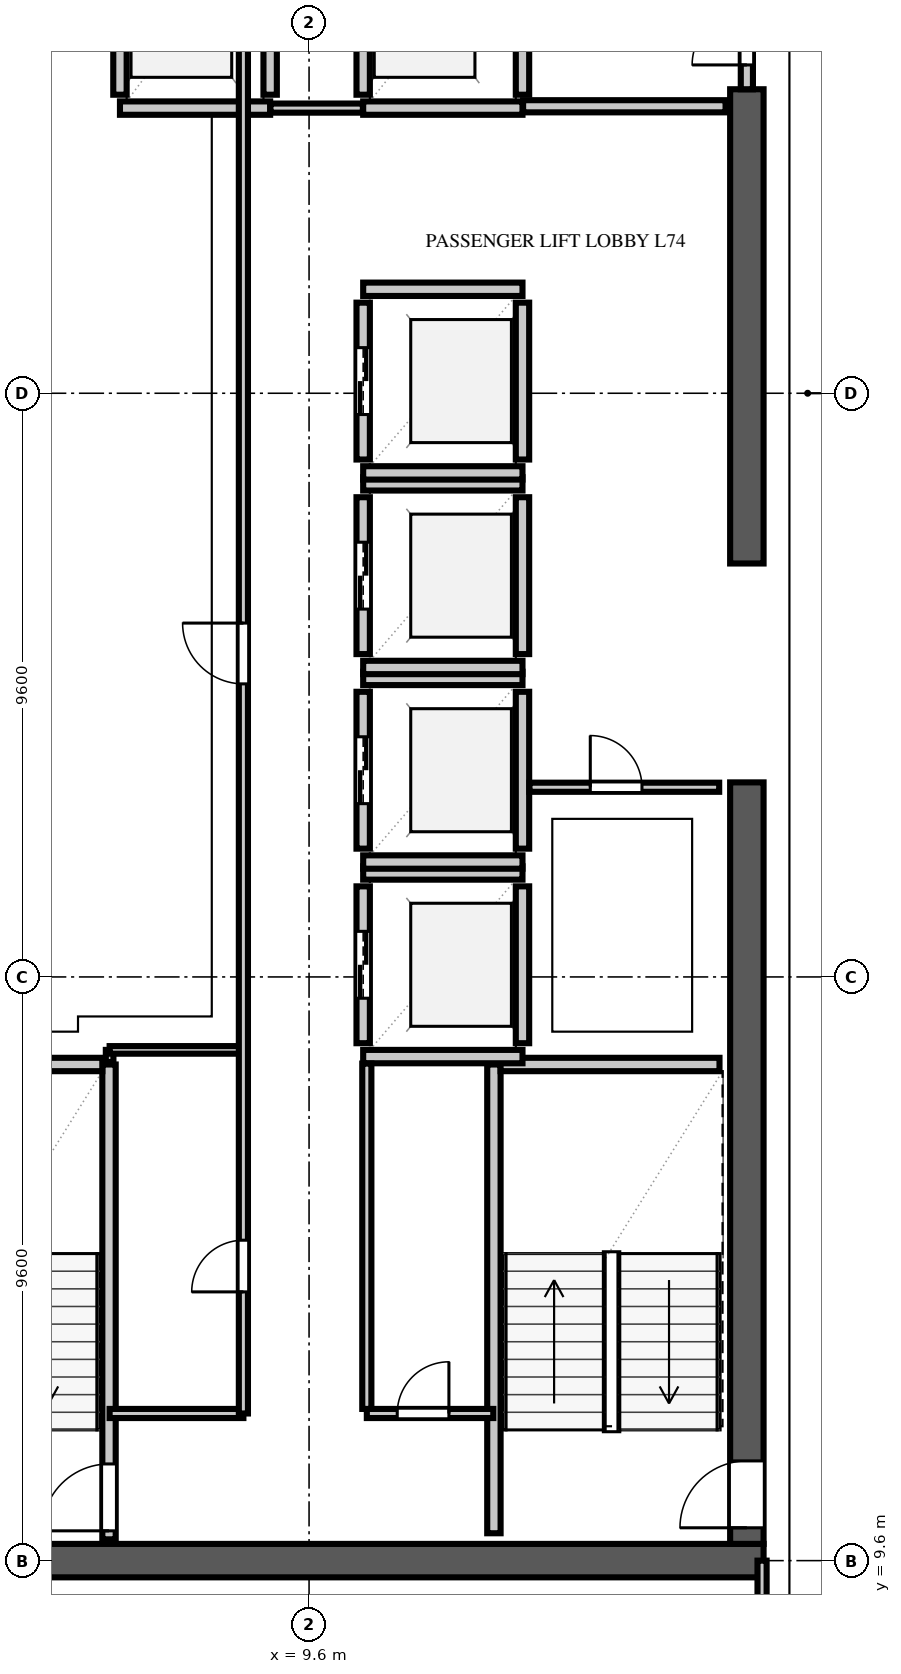
"""IFC4 building model, lengths in metres.
Left out: names, types, materials, properties, quantities, classifications, styles, units other than length and angle.
Written with IfcOpenShell. Run it as: python <this file> out.ifc"""

import sys

from ifc_helpers import new_model, si_unit, direction, frame, frame_2d, origin, place, context, subcontext, project, spatial, rectangle, extrude, element, fill, save


model = new_model("IFC4")
c1 = context("Model", 3, precision=1e-05, world=origin(), true_north=direction((0.0, 1.0)))
c2 = subcontext(c1, "Body", "Model", "MODEL_VIEW")
j1 = project(units=[si_unit("LENGTHUNIT", "METRE"), si_unit("PLANEANGLEUNIT", "RADIAN")], contexts=[c1])
p1 = place(None, origin())
s1 = spatial("IfcSite", under=j1, at=p1, CompositionType="ELEMENT")
p2 = place(p1, origin())
s2 = spatial("IfcBuilding", under=s1, at=p2, CompositionType="ELEMENT")
p3 = place(p2, frame((0.0, 0.0, 292.4)))
s3 = spatial("IfcBuildingStorey", under=s2, at=p3, CompositionType="ELEMENT", Elevation=292.4)
p4 = place(p3, frame((2.475, 9.6, 0.0), z_axis=(0.0, 0.0, 1.0), x_axis=(1.0, 0.0, 0.0)))
e1 = element("IfcWall", 1, at=p4, inside=s3, PredefinedType="SHEAR", context=c2, shape_type="SweptSolid", body=[
    extrude(rectangle(XDim=14.6, YDim=0.55, at=frame_2d((7.3, 0.0))), origin(), (0.0, 0.0, 1.0), 3.54),
])
p5 = place(p3, frame((16.8, 9.875, 0.0), z_axis=(0.0, 0.0, 1.0), x_axis=(0.0, 1.0, 0.0)))
e2 = element("IfcWall", 2, at=p5, inside=s3, PredefinedType="SHEAR", context=c2, shape_type="SweptSolid", body=[
    extrude(rectangle(XDim=12.525, YDim=0.55, at=frame_2d((6.262, 0.0))), origin(), (0.0, 0.0, 1.0), 3.54),
])
p6 = place(p5, frame((0.265, 0.0, 0.0)))
e3 = element("IfcOpeningElement", 3, at=p6, cuts=e2, PredefinedType="OPENING", context=c2, shape_type="SweptSolid", body=[
    extrude(rectangle(XDim=1.1, YDim=2.2, at=frame_2d((0.55, 1.1))), frame((0.0, 0.287, 0.0), z_axis=(0.0, -1.0, 0.0), x_axis=(1.0, 0.0, 0.0)), (0.0, 0.0, 1.0), 0.574),
])
p7 = place(p3, frame((16.8, 26.0, 0.0), z_axis=(0.0, 0.0, 1.0), x_axis=(0.0, 1.0, 0.0)))
e4 = element("IfcWall", 4, at=p7, inside=s3, PredefinedType="SHEAR", context=c2, shape_type="SweptSolid", body=[
    extrude(rectangle(XDim=7.8, YDim=0.55, at=frame_2d((3.9, 0.0))), origin(), (0.0, 0.0, 1.0), 3.54),
])
p8 = place(p3, frame((6.31, 9.95, 0.0), z_axis=(0.0, 0.0, 1.0), x_axis=(0.0, 1.0, 0.0)))
e5 = element("IfcWall", 5, at=p8, inside=s3, PredefinedType="SOLIDWALL", context=c2, shape_type="SweptSolid", body=[
    extrude(rectangle(XDim=7.81, YDim=0.22, at=frame_2d((3.905, 0.0))), origin(), (0.0, 0.0, 1.0), 3.54),
])
p9 = place(p8, frame((0.14, 0.0, 0.0)))
e6 = element("IfcOpeningElement", 6, at=p9, cuts=e5, PredefinedType="OPENING", context=c2, shape_type="SweptSolid", body=[
    extrude(rectangle(XDim=1.1, YDim=2.2, at=frame_2d((0.55, 1.1))), frame((0.0, 0.122, 0.0), z_axis=(0.0, -1.0, 0.0), x_axis=(1.0, 0.0, 0.0)), (0.0, 0.0, 1.0), 0.244),
])
p10 = place(p3, frame((2.65, 17.76, 0.0), z_axis=(0.0, 0.0, 1.0), x_axis=(1.0, 0.0, 0.0)))
e7 = element("IfcWall", 7, at=p10, inside=s3, PredefinedType="SOLIDWALL", context=c2, shape_type="SweptSolid", body=[
    extrude(rectangle(XDim=3.55, YDim=0.22, at=frame_2d((1.775, 0.0))), origin(), (0.0, 0.0, 1.0), 3.54),
])
p11 = place(p3, frame((12.64, 10.05, 0.0), z_axis=(0.0, 0.0, 1.0), x_axis=(0.0, 1.0, 0.0)))
e8 = element("IfcWall", 8, at=p11, inside=s3, PredefinedType="SOLIDWALL", context=c2, shape_type="SweptSolid", body=[
    extrude(rectangle(XDim=7.71, YDim=0.22, at=frame_2d((3.855, 0.0))), origin(), (0.0, 0.0, 1.0), 3.54),
])
p12 = place(p3, frame((12.75, 17.76, 0.0), z_axis=(0.0, 0.0, 1.0), x_axis=(1.0, 0.0, 0.0)))
e9 = element("IfcWall", 9, at=p12, inside=s3, PredefinedType="SOLIDWALL", context=c2, shape_type="SweptSolid", body=[
    extrude(rectangle(XDim=3.6, YDim=0.22, at=frame_2d((1.8, 0.0))), origin(), (0.0, 0.0, 1.0), 3.54),
])
p13 = place(p3, frame((10.49, 18.11, 0.0), z_axis=(0.0, 0.0, 1.0), x_axis=(0.0, 1.0, 0.0)))
e10 = element("IfcWall", 10, at=p13, inside=s3, PredefinedType="SOLIDWALL", context=c2, shape_type="SweptSolid", body=[
    extrude(rectangle(XDim=2.58, YDim=0.22, at=frame_2d((1.29, 0.0))), origin(), (0.0, 0.0, 1.0), 3.54),
])
p14 = place(p13, frame((0.74, 0.0, 0.0)))
e11 = element("IfcOpeningElement", 11, at=p14, cuts=e10, PredefinedType="OPENING", context=c2, shape_type="SweptSolid", body=[
    extrude(rectangle(XDim=1.1, YDim=2.2, at=frame_2d((0.55, 1.1))), frame((0.0, 0.122, 0.0), z_axis=(0.0, -1.0, 0.0), x_axis=(1.0, 0.0, 0.0)), (0.0, 0.0, 1.0), 0.244),
])
p15 = place(p3, frame((13.11, 18.11, 0.0), z_axis=(0.0, 0.0, 1.0), x_axis=(0.0, 1.0, 0.0)))
e12 = element("IfcWall", 12, at=p15, inside=s3, PredefinedType="SOLIDWALL", context=c2, shape_type="SweptSolid", body=[
    extrude(rectangle(XDim=2.58, YDim=0.22, at=frame_2d((1.29, 0.0))), origin(), (0.0, 0.0, 1.0), 3.54),
])
for number, where, z_axis, x_axis in (
    (13, (10.49, 17.89, 0.0), (0.0, 0.0, 1.0), (1.0, 0.0, 0.0)),
    (14, (10.49, 20.91, 0.0), (0.0, 0.0, 1.0), (1.0, 0.0, 0.0)),
):
    element("IfcWall", number, at=place(p3, frame(where, z_axis=z_axis, x_axis=x_axis)), inside=s3, PredefinedType="SOLIDWALL", context=c2, shape_type="SweptSolid", body=[
        extrude(rectangle(XDim=2.62, YDim=0.22, at=frame_2d((1.31, 0.0))), origin(), (0.0, 0.0, 1.0), 3.54),
    ])
p16 = place(p3, frame((10.49, 21.31, 0.0), z_axis=(0.0, 0.0, 1.0), x_axis=(0.0, 1.0, 0.0)))
e15 = element("IfcWall", 15, at=p16, inside=s3, PredefinedType="SOLIDWALL", context=c2, shape_type="SweptSolid", body=[
    extrude(rectangle(XDim=2.58, YDim=0.22, at=frame_2d((1.29, 0.0))), origin(), (0.0, 0.0, 1.0), 3.54),
])
p17 = place(p16, frame((0.74, 0.0, 0.0)))
e16 = element("IfcOpeningElement", 16, at=p17, cuts=e15, PredefinedType="OPENING", context=c2, shape_type="SweptSolid", body=[
    extrude(rectangle(XDim=1.1, YDim=2.2, at=frame_2d((0.55, 1.1))), frame((0.0, 0.122, 0.0), z_axis=(0.0, -1.0, 0.0), x_axis=(1.0, 0.0, 0.0)), (0.0, 0.0, 1.0), 0.244),
])
p18 = place(p3, frame((13.11, 21.31, 0.0), z_axis=(0.0, 0.0, 1.0), x_axis=(0.0, 1.0, 0.0)))
e17 = element("IfcWall", 17, at=p18, inside=s3, PredefinedType="SOLIDWALL", context=c2, shape_type="SweptSolid", body=[
    extrude(rectangle(XDim=2.58, YDim=0.22, at=frame_2d((1.29, 0.0))), origin(), (0.0, 0.0, 1.0), 3.54),
])
for number, where, z_axis, x_axis in (
    (18, (10.49, 21.09, 0.0), (0.0, 0.0, 1.0), (1.0, 0.0, 0.0)),
    (19, (10.49, 24.11, 0.0), (0.0, 0.0, 1.0), (1.0, 0.0, 0.0)),
):
    element("IfcWall", number, at=place(p3, frame(where, z_axis=z_axis, x_axis=x_axis)), inside=s3, PredefinedType="SOLIDWALL", context=c2, shape_type="SweptSolid", body=[
        extrude(rectangle(XDim=2.62, YDim=0.22, at=frame_2d((1.31, 0.0))), origin(), (0.0, 0.0, 1.0), 3.54),
    ])
p19 = place(p3, frame((10.49, 24.51, 0.0), z_axis=(0.0, 0.0, 1.0), x_axis=(0.0, 1.0, 0.0)))
e20 = element("IfcWall", 20, at=p19, inside=s3, PredefinedType="SOLIDWALL", context=c2, shape_type="SweptSolid", body=[
    extrude(rectangle(XDim=2.58, YDim=0.22, at=frame_2d((1.29, 0.0))), origin(), (0.0, 0.0, 1.0), 3.54),
])
p20 = place(p19, frame((0.74, 0.0, 0.0)))
e21 = element("IfcOpeningElement", 21, at=p20, cuts=e20, PredefinedType="OPENING", context=c2, shape_type="SweptSolid", body=[
    extrude(rectangle(XDim=1.1, YDim=2.2, at=frame_2d((0.55, 1.1))), frame((0.0, 0.122, 0.0), z_axis=(0.0, -1.0, 0.0), x_axis=(1.0, 0.0, 0.0)), (0.0, 0.0, 1.0), 0.244),
])
p21 = place(p3, frame((13.11, 24.51, 0.0), z_axis=(0.0, 0.0, 1.0), x_axis=(0.0, 1.0, 0.0)))
e22 = element("IfcWall", 22, at=p21, inside=s3, PredefinedType="SOLIDWALL", context=c2, shape_type="SweptSolid", body=[
    extrude(rectangle(XDim=2.58, YDim=0.22, at=frame_2d((1.29, 0.0))), origin(), (0.0, 0.0, 1.0), 3.54),
])
for number, where, z_axis, x_axis in (
    (23, (10.49, 24.29, 0.0), (0.0, 0.0, 1.0), (1.0, 0.0, 0.0)),
    (24, (10.49, 27.31, 0.0), (0.0, 0.0, 1.0), (1.0, 0.0, 0.0)),
):
    element("IfcWall", number, at=place(p3, frame(where, z_axis=z_axis, x_axis=x_axis)), inside=s3, PredefinedType="SOLIDWALL", context=c2, shape_type="SweptSolid", body=[
        extrude(rectangle(XDim=2.62, YDim=0.22, at=frame_2d((1.31, 0.0))), origin(), (0.0, 0.0, 1.0), 3.54),
    ])
p22 = place(p3, frame((10.49, 27.71, 0.0), z_axis=(0.0, 0.0, 1.0), x_axis=(0.0, 1.0, 0.0)))
e25 = element("IfcWall", 25, at=p22, inside=s3, PredefinedType="SOLIDWALL", context=c2, shape_type="SweptSolid", body=[
    extrude(rectangle(XDim=2.58, YDim=0.22, at=frame_2d((1.29, 0.0))), origin(), (0.0, 0.0, 1.0), 3.54),
])
p23 = place(p22, frame((0.74, 0.0, 0.0)))
e26 = element("IfcOpeningElement", 26, at=p23, cuts=e25, PredefinedType="OPENING", context=c2, shape_type="SweptSolid", body=[
    extrude(rectangle(XDim=1.1, YDim=2.2, at=frame_2d((0.55, 1.1))), frame((0.0, 0.122, 0.0), z_axis=(0.0, -1.0, 0.0), x_axis=(1.0, 0.0, 0.0)), (0.0, 0.0, 1.0), 0.244),
])
p24 = place(p3, frame((13.11, 27.71, 0.0), z_axis=(0.0, 0.0, 1.0), x_axis=(0.0, 1.0, 0.0)))
e27 = element("IfcWall", 27, at=p24, inside=s3, PredefinedType="SOLIDWALL", context=c2, shape_type="SweptSolid", body=[
    extrude(rectangle(XDim=2.58, YDim=0.22, at=frame_2d((1.29, 0.0))), origin(), (0.0, 0.0, 1.0), 3.54),
])
for number, where, z_axis, x_axis in (
    (28, (10.49, 27.49, 0.0), (0.0, 0.0, 1.0), (1.0, 0.0, 0.0)),
    (29, (10.49, 30.51, 0.0), (0.0, 0.0, 1.0), (1.0, 0.0, 0.0)),
):
    element("IfcWall", number, at=place(p3, frame(where, z_axis=z_axis, x_axis=x_axis)), inside=s3, PredefinedType="SOLIDWALL", context=c2, shape_type="SweptSolid", body=[
        extrude(rectangle(XDim=2.62, YDim=0.22, at=frame_2d((1.31, 0.0))), origin(), (0.0, 0.0, 1.0), 3.54),
    ])
for number, where, z_axis, x_axis in (
    (30, (6.49, 33.71, 0.0), (0.0, 0.0, 1.0), (0.0, 1.0, 0.0)),
    (31, (8.96, 33.71, 0.0), (0.0, 0.0, 1.0), (0.0, 1.0, 0.0)),
):
    element("IfcWall", number, at=place(p3, frame(where, z_axis=z_axis, x_axis=x_axis)), inside=s3, PredefinedType="SOLIDWALL", context=c2, shape_type="SweptSolid", body=[
        extrude(rectangle(XDim=2.78, YDim=0.22, at=frame_2d((1.39, 0.0))), origin(), (0.0, 0.0, 1.0), 3.54),
    ])
p25 = place(p3, frame((6.49, 33.49, 0.0), z_axis=(0.0, 0.0, 1.0), x_axis=(1.0, 0.0, 0.0)))
e32 = element("IfcWall", 32, at=p25, inside=s3, PredefinedType="SOLIDWALL", context=c2, shape_type="SweptSolid", body=[
    extrude(rectangle(XDim=2.47, YDim=0.22, at=frame_2d((1.235, 0.0))), origin(), (0.0, 0.0, 1.0), 3.54),
])
for number, where, z_axis, x_axis in (
    (33, (10.49, 33.71, 0.0), (0.0, 0.0, 1.0), (0.0, 1.0, 0.0)),
    (34, (13.11, 33.71, 0.0), (0.0, 0.0, 1.0), (0.0, 1.0, 0.0)),
):
    element("IfcWall", number, at=place(p3, frame(where, z_axis=z_axis, x_axis=x_axis)), inside=s3, PredefinedType="SOLIDWALL", context=c2, shape_type="SweptSolid", body=[
        extrude(rectangle(XDim=2.78, YDim=0.22, at=frame_2d((1.39, 0.0))), origin(), (0.0, 0.0, 1.0), 3.54),
    ])
p26 = place(p3, frame((10.49, 33.49, 0.0), z_axis=(0.0, 0.0, 1.0), x_axis=(1.0, 0.0, 0.0)))
e35 = element("IfcWall", 35, at=p26, inside=s3, PredefinedType="SOLIDWALL", context=c2, shape_type="SweptSolid", body=[
    extrude(rectangle(XDim=2.62, YDim=0.22, at=frame_2d((1.31, 0.0))), origin(), (0.0, 0.0, 1.0), 3.54),
])
p27 = place(p3, frame((13.12, 33.52, 0.0), z_axis=(0.0, 0.0, 1.0), x_axis=(1.0, 0.0, 0.0)))
e36 = element("IfcWall", 36, at=p27, inside=s3, PredefinedType="SOLIDWALL", context=c2, shape_type="SweptSolid", body=[
    extrude(rectangle(XDim=3.33, YDim=0.2, at=frame_2d((1.665, 0.0))), origin(), (0.0, 0.0, 1.0), 3.54),
])
p28 = place(p3, frame((16.8, 33.8, 0.0), z_axis=(0.0, 0.0, 1.0), x_axis=(0.0, 1.0, 0.0)))
e37 = element("IfcWall", 37, at=p28, inside=s3, PredefinedType="SOLIDWALL", context=c2, shape_type="SweptSolid", body=[
    extrude(rectangle(XDim=2.6, YDim=0.2, at=frame_2d((1.3, 0.0))), origin(), (0.0, 0.0, 1.0), 3.54),
])
p29 = place(p28, frame((0.4, 0.0, 0.0)))
e38 = element("IfcOpeningElement", 38, at=p29, cuts=e37, PredefinedType="OPENING", context=c2, shape_type="SweptSolid", body=[
    extrude(rectangle(XDim=1.8, YDim=2.2, at=frame_2d((0.9, 1.1))), frame((0.0, 0.112, 0.0), z_axis=(0.0, -1.0, 0.0), x_axis=(1.0, 0.0, 0.0)), (0.0, 0.0, 1.0), 0.224),
])
p30 = place(p3, frame((8.965, 33.49, 0.0), z_axis=(0.0, 0.0, 1.0), x_axis=(1.0, 0.0, 0.0)))
e39 = element("IfcWall", 39, at=p30, inside=s3, PredefinedType="PARTITIONING", context=c2, shape_type="SweptSolid", body=[
    extrude(rectangle(XDim=1.52, YDim=0.15, at=frame_2d((0.76, 0.0))), origin(), (0.0, 0.0, 1.0), 3.54),
])
p31 = place(p3, frame((10.55, 12.02, 0.0), z_axis=(0.0, 0.0, 1.0), x_axis=(1.0, 0.0, 0.0)))
e40 = element("IfcWall", 40, at=p31, inside=s3, PredefinedType="PARTITIONING", context=c2, shape_type="SweptSolid", body=[
    extrude(rectangle(XDim=2.08, YDim=0.15, at=frame_2d((1.04, 0.0))), origin(), (0.0, 0.0, 1.0), 3.54),
])
p32 = place(p31, frame((0.5, 0.0, 0.0)))
e41 = element("IfcOpeningElement", 41, at=p32, cuts=e40, PredefinedType="OPENING", context=c2, shape_type="SweptSolid", body=[
    extrude(rectangle(XDim=0.85, YDim=2.1, at=frame_2d((0.425, 1.05))), frame((0.0, 0.087, 0.0), z_axis=(0.0, -1.0, 0.0), x_axis=(1.0, 0.0, 0.0)), (0.0, 0.0, 1.0), 0.174),
])
p33 = place(p3, frame((10.55, 12.095, 0.0), z_axis=(0.0, 0.0, 1.0), x_axis=(0.0, 1.0, 0.0)))
e42 = element("IfcWall", 42, at=p33, inside=s3, PredefinedType="PARTITIONING", context=c2, shape_type="SweptSolid", body=[
    extrude(rectangle(XDim=5.68, YDim=0.15, at=frame_2d((2.84, 0.0))), origin(), (0.0, 0.0, 1.0), 3.54),
])
p34 = place(p3, frame((13.225, 22.32, 0.0), z_axis=(0.0, 0.0, 1.0), x_axis=(1.0, 0.0, 0.0)))
e43 = element("IfcWall", 43, at=p34, inside=s3, PredefinedType="PARTITIONING", context=c2, shape_type="SweptSolid", body=[
    extrude(rectangle(XDim=3.12, YDim=0.15, at=frame_2d((1.56, 0.0))), origin(), (0.0, 0.0, 1.0), 3.54),
])
p35 = place(p34, frame((1.0, 0.0, 0.0)))
e44 = element("IfcOpeningElement", 44, at=p35, cuts=e43, PredefinedType="OPENING", context=c2, shape_type="SweptSolid", body=[
    extrude(rectangle(XDim=0.85, YDim=2.1, at=frame_2d((0.425, 1.05))), frame((0.0, 0.087, 0.0), z_axis=(0.0, -1.0, 0.0), x_axis=(1.0, 0.0, 0.0)), (0.0, 0.0, 1.0), 0.174),
])
p36 = place(p3, frame((6.32, 12.02, 0.0), z_axis=(0.0, 0.0, 1.0), x_axis=(1.0, 0.0, 0.0)))
e45 = element("IfcWall", 45, at=p36, inside=s3, PredefinedType="PARTITIONING", context=c2, shape_type="SweptSolid", body=[
    extrude(rectangle(XDim=2.2, YDim=0.15, at=frame_2d((1.1, 0.0))), origin(), (0.0, 0.0, 1.0), 3.54),
])
p37 = place(p3, frame((6.32, 17.8, 0.0), z_axis=(0.0, 0.0, 1.0), x_axis=(0.0, 1.0, 0.0)))
e46 = element("IfcWall", 46, at=p37, inside=s3, PredefinedType="PARTITIONING", context=c2, shape_type="SweptSolid", body=[
    extrude(rectangle(XDim=0.2, YDim=0.125, at=frame_2d((0.1, 0.0))), origin(), (0.0, 0.0, 1.0), 3.54),
])
p38 = place(p3, frame((6.32, 18.0, 0.0), z_axis=(0.0, 0.0, 1.0), x_axis=(1.0, 0.0, 0.0)))
e47 = element("IfcWall", 47, at=p38, inside=s3, PredefinedType="PARTITIONING", context=c2, shape_type="SweptSolid", body=[
    extrude(rectangle(XDim=2.2, YDim=0.125, at=frame_2d((1.1, 0.0))), origin(), (0.0, 0.0, 1.0), 3.54),
])
p39 = place(p3, frame((8.52, 12.02, 0.0), z_axis=(0.0, 0.0, 1.0), x_axis=(0.0, 1.0, 0.0)))
e48 = element("IfcWall", 48, at=p39, inside=s3, PredefinedType="PARTITIONING", context=c2, shape_type="SweptSolid", body=[
    extrude(rectangle(XDim=24.76, YDim=0.15, at=frame_2d((12.38, 0.0))), origin(), (0.0, 0.0, 1.0), 3.54),
])
p40 = place(p39, frame((2.0, 0.0, 0.0)))
e49 = element("IfcOpeningElement", 49, at=p40, cuts=e48, PredefinedType="OPENING", context=c2, shape_type="SweptSolid", body=[
    extrude(rectangle(XDim=0.85, YDim=2.1, at=frame_2d((0.425, 1.05))), frame((0.0, 0.087, 0.0), z_axis=(0.0, -1.0, 0.0), x_axis=(1.0, 0.0, 0.0)), (0.0, 0.0, 1.0), 0.174),
])
p41 = place(p39, frame((12.0, 0.0, 0.0)))
e50 = element("IfcOpeningElement", 50, at=p41, cuts=e48, PredefinedType="OPENING", context=c2, shape_type="SweptSolid", body=[
    extrude(rectangle(XDim=1.0, YDim=2.2, at=frame_2d((0.5, 1.1))), frame((0.0, 0.087, 0.0), z_axis=(0.0, -1.0, 0.0), x_axis=(1.0, 0.0, 0.0)), (0.0, 0.0, 1.0), 0.174),
])
p42 = place(p3, frame((17.05, 0.22, 0.0), z_axis=(0.0, 0.0, 1.0), x_axis=(0.0, 1.0, 0.0)))
e51 = element("IfcWall", 51, at=p42, inside=s3, PredefinedType="PARTITIONING", context=c2, shape_type="SweptSolid", body=[
    extrude(rectangle(XDim=9.38, YDim=0.15, at=frame_2d((4.69, 0.0))), origin(), (0.0, 0.0, 1.0), 3.54),
])
p43 = place(p42, frame((5.58, 0.0, 0.0)))
e52 = element("IfcOpeningElement", 52, at=p43, cuts=e51, PredefinedType="OPENING", context=c2, shape_type="SweptSolid", body=[
    extrude(rectangle(XDim=0.95, YDim=2.15, at=frame_2d((0.475, 1.075))), frame((0.0, 0.087, 0.0), z_axis=(0.0, -1.0, 0.0), x_axis=(1.0, 0.0, 0.0)), (0.0, 0.0, 1.0), 0.174),
])
p44 = place(p9, origin())
e53 = element("IfcDoor", 53, at=p44, inside=s3, OperationType="SINGLE_SWING_LEFT", PredefinedType="DOOR", context=c2, shape_type="SweptSolid", body=[
    extrude(rectangle(XDim=1.1, YDim=2.2, at=frame_2d((0.55, 1.1))), frame((0.0, 0.025, 0.0), z_axis=(0.0, -1.0, 0.0), x_axis=(1.0, 0.0, 0.0)), (0.0, 0.0, 1.0), 0.05),
])
fill(e6, e53)
p45 = place(p6, origin())
e54 = element("IfcDoor", 54, at=p45, inside=s3, OperationType="SINGLE_SWING_LEFT", PredefinedType="DOOR", context=c2, shape_type="SweptSolid", body=[
    extrude(rectangle(XDim=1.1, YDim=2.2, at=frame_2d((0.55, 1.1))), frame((0.0, 0.025, 0.0), z_axis=(0.0, -1.0, 0.0), x_axis=(1.0, 0.0, 0.0)), (0.0, 0.0, 1.0), 0.05),
])
fill(e3, e54)
p46 = place(p14, origin())
e55 = element("IfcDoor", 55, at=p46, inside=s3, OperationType="DOUBLE_DOOR_SLIDING", PredefinedType="DOOR", context=c2, shape_type="SweptSolid", body=[
    extrude(rectangle(XDim=1.1, YDim=2.2, at=frame_2d((0.55, 1.1))), frame((0.0, 0.025, 0.0), z_axis=(0.0, -1.0, 0.0), x_axis=(1.0, 0.0, 0.0)), (0.0, 0.0, 1.0), 0.05),
])
fill(e11, e55)
p47 = place(p17, origin())
e56 = element("IfcDoor", 56, at=p47, inside=s3, OperationType="DOUBLE_DOOR_SLIDING", PredefinedType="DOOR", context=c2, shape_type="SweptSolid", body=[
    extrude(rectangle(XDim=1.1, YDim=2.2, at=frame_2d((0.55, 1.1))), frame((0.0, 0.025, 0.0), z_axis=(0.0, -1.0, 0.0), x_axis=(1.0, 0.0, 0.0)), (0.0, 0.0, 1.0), 0.05),
])
fill(e16, e56)
p48 = place(p20, origin())
e57 = element("IfcDoor", 57, at=p48, inside=s3, OperationType="DOUBLE_DOOR_SLIDING", PredefinedType="DOOR", context=c2, shape_type="SweptSolid", body=[
    extrude(rectangle(XDim=1.1, YDim=2.2, at=frame_2d((0.55, 1.1))), frame((0.0, 0.025, 0.0), z_axis=(0.0, -1.0, 0.0), x_axis=(1.0, 0.0, 0.0)), (0.0, 0.0, 1.0), 0.05),
])
fill(e21, e57)
p49 = place(p23, origin())
e58 = element("IfcDoor", 58, at=p49, inside=s3, OperationType="DOUBLE_DOOR_SLIDING", PredefinedType="DOOR", context=c2, shape_type="SweptSolid", body=[
    extrude(rectangle(XDim=1.1, YDim=2.2, at=frame_2d((0.55, 1.1))), frame((0.0, 0.025, 0.0), z_axis=(0.0, -1.0, 0.0), x_axis=(1.0, 0.0, 0.0)), (0.0, 0.0, 1.0), 0.05),
])
fill(e26, e58)
p50 = place(p29, origin())
e59 = element("IfcDoor", 59, at=p50, inside=s3, OperationType="DOUBLE_DOOR_SINGLE_SWING", PredefinedType="DOOR", context=c2, shape_type="SweptSolid", body=[
    extrude(rectangle(XDim=1.8, YDim=2.2, at=frame_2d((0.9, 1.1))), frame((0.0, 0.025, 0.0), z_axis=(0.0, -1.0, 0.0), x_axis=(1.0, 0.0, 0.0)), (0.0, 0.0, 1.0), 0.05),
])
fill(e38, e59)
p51 = place(p32, origin())
e60 = element("IfcDoor", 60, at=p51, inside=s3, OperationType="SINGLE_SWING_RIGHT", PredefinedType="DOOR", context=c2, shape_type="SweptSolid", body=[
    extrude(rectangle(XDim=0.85, YDim=2.1, at=frame_2d((0.425, 1.05))), frame((0.0, 0.025, 0.0), z_axis=(0.0, -1.0, 0.0), x_axis=(1.0, 0.0, 0.0)), (0.0, 0.0, 1.0), 0.05),
])
fill(e41, e60)
p52 = place(p35, origin())
e61 = element("IfcDoor", 61, at=p52, inside=s3, OperationType="SINGLE_SWING_LEFT", PredefinedType="DOOR", context=c2, shape_type="SweptSolid", body=[
    extrude(rectangle(XDim=0.85, YDim=2.1, at=frame_2d((0.425, 1.05))), frame((0.0, 0.025, 0.0), z_axis=(0.0, -1.0, 0.0), x_axis=(1.0, 0.0, 0.0)), (0.0, 0.0, 1.0), 0.05),
])
fill(e44, e61)
p53 = place(p40, origin())
e62 = element("IfcDoor", 62, at=p53, inside=s3, OperationType="SINGLE_SWING_LEFT", PredefinedType="DOOR", context=c2, shape_type="SweptSolid", body=[
    extrude(rectangle(XDim=0.85, YDim=2.1, at=frame_2d((0.425, 1.05))), frame((0.0, 0.025, 0.0), z_axis=(0.0, -1.0, 0.0), x_axis=(1.0, 0.0, 0.0)), (0.0, 0.0, 1.0), 0.05),
])
fill(e49, e62)
p54 = place(p41, origin())
e63 = element("IfcDoor", 63, at=p54, inside=s3, OperationType="SINGLE_SWING_RIGHT", PredefinedType="DOOR", context=c2, shape_type="SweptSolid", body=[
    extrude(rectangle(XDim=1.0, YDim=2.2, at=frame_2d((0.5, 1.1))), frame((0.0, 0.025, 0.0), z_axis=(0.0, -1.0, 0.0), x_axis=(1.0, 0.0, 0.0)), (0.0, 0.0, 1.0), 0.05),
])
fill(e50, e63)
save(model, sys.argv[1])
